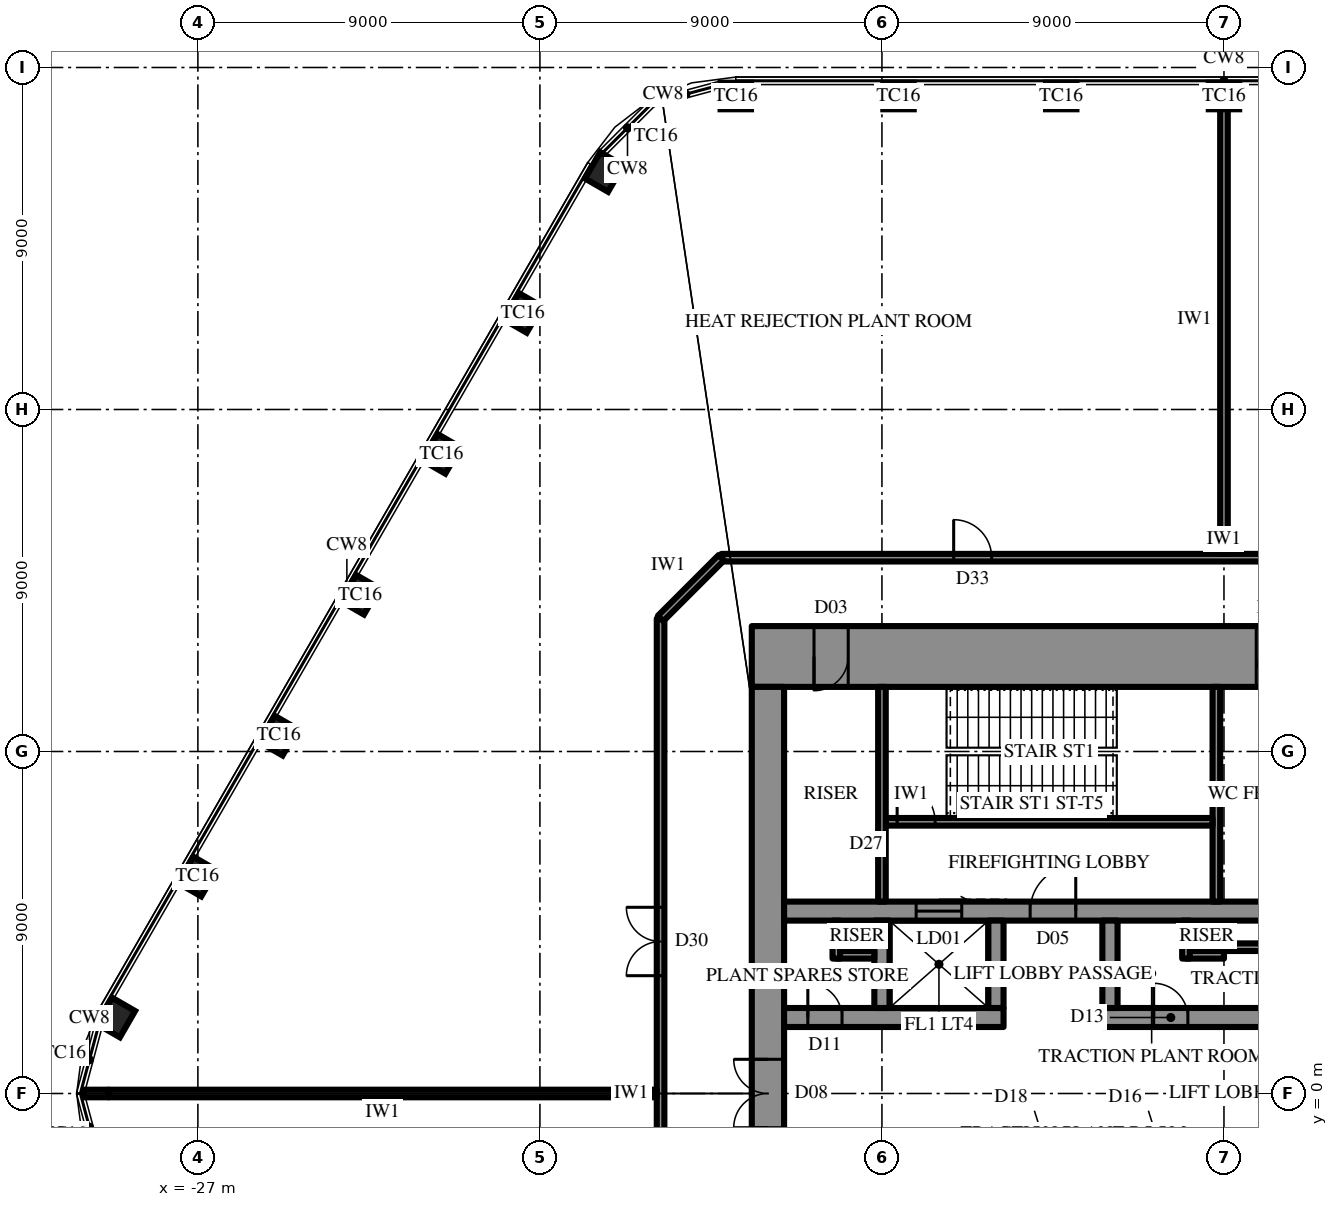
"""IFC4 building model, lengths in metres.
Left out: names, types, materials, properties, quantities, classifications, styles, units other than length and angle.
Written with IfcOpenShell. Run it as: python <this file> out.ifc"""

import sys

from ifc_helpers import new_model, si_unit, direction, frame, frame_2d, origin, origin_2d, place, context, subcontext, project, spatial, rectangle, extrude, element, fill, save


model = new_model("IFC4")
c1 = context("Model", 3, precision=1e-05, world=origin(), true_north=direction((0.0, 1.0)))
c2 = subcontext(c1, "Body", "Model", "MODEL_VIEW")
j1 = project(units=[si_unit("LENGTHUNIT", "METRE"), si_unit("PLANEANGLEUNIT", "RADIAN")], contexts=[c1])
p1 = place(None, origin())
s1 = spatial("IfcSite", under=j1, at=p1, CompositionType="ELEMENT")
p2 = place(p1, origin())
s2 = spatial("IfcBuilding", under=s1, at=p2, CompositionType="ELEMENT")
p3 = place(p2, frame((0.0, 0.0, 396.3)))
s3 = spatial("IfcBuildingStorey", under=s2, at=p3, CompositionType="ELEMENT", Elevation=396.3)
for number, where, z_axis, x_axis in (
    (1, (0.0, 26.25, 0.0), (0.0, 0.0, 1.0), (-1.0, 0.0, 0.0)),
    (2, (-4.282, 26.25, 0.0), (0.0, 0.0, 1.0), (-1.0, 0.0, 0.0)),
    (3, (-8.564, 26.25, 0.0), (0.0, 0.0, 1.0), (-1.0, 0.0, 0.0)),
    (4, (-12.846, 26.25, 0.0), (0.0, 0.0, 1.0), (-1.0, 0.0, 0.0)),
    (5, (-16.31, 24.25, 0.0), (0.0, 0.0, 1.0), (-0.5, -0.866, 0.0)),
    (6, (-18.451, 20.542, 0.0), (0.0, 0.0, 1.0), (-0.5, -0.866, 0.0)),
    (7, (-20.592, 16.833, 0.0), (0.0, 0.0, 1.0), (-0.5, -0.866, 0.0)),
    (8, (-22.733, 13.125, 0.0), (0.0, 0.0, 1.0), (-0.5, -0.866, 0.0)),
    (9, (-24.874, 9.417, 0.0), (0.0, 0.0, 1.0), (-0.5, -0.866, 0.0)),
    (10, (-27.015, 5.708, 0.0), (0.0, 0.0, 1.0), (-0.5, -0.866, 0.0)),
    (11, (-29.156, 2.0, 0.0), (0.0, 0.0, 1.0), (-0.5, -0.866, 0.0)),
):
    element("IfcColumn", number, at=place(p3, frame(where, z_axis=z_axis, x_axis=x_axis)), inside=s3, PredefinedType="COLUMN", context=c2, shape_type="SweptSolid", body=[
        extrude(rectangle(XDim=0.8, YDim=0.7, at=origin_2d()), origin(), (0.0, 0.0, 1.0), 6.0),
    ])
p4 = place(p3, frame((-12.425, 11.5, 0.0), z_axis=(0.0, 0.0, 1.0), x_axis=(1.0, 0.0, 0.0)))
e12 = element("IfcWall", 12, at=p4, inside=s3, PredefinedType="SHEAR", context=c2, shape_type="SweptSolid", body=[
    extrude(rectangle(XDim=24.85, YDim=1.6, at=frame_2d((12.425, 0.0))), origin(), (0.0, 0.0, 1.0), 6.0),
])
p5 = place(p4, frame((13.275, 0.0, 0.0)))
e13 = element("IfcOpeningElement", 13, at=p5, cuts=e12, PredefinedType="OPENING", context=c2, shape_type="SweptSolid", body=[
    extrude(rectangle(XDim=0.9, YDim=2.2, at=frame_2d((0.45, 1.1))), frame((0.0, 0.81, 0.0), z_axis=(0.0, -1.0, 0.0), x_axis=(1.0, 0.0, 0.0)), (0.0, 0.0, 1.0), 1.62),
])
p6 = place(p4, frame((16.275, 0.0, 0.0)))
e14 = element("IfcOpeningElement", 14, at=p6, cuts=e12, PredefinedType="OPENING", context=c2, shape_type="SweptSolid", body=[
    extrude(rectangle(XDim=0.9, YDim=2.2, at=frame_2d((0.45, 1.1))), frame((0.0, 0.81, 0.0), z_axis=(0.0, -1.0, 0.0), x_axis=(1.0, 0.0, 0.0)), (0.0, 0.0, 1.0), 1.62),
])
p7 = place(p4, frame((19.325, 0.0, 0.0)))
e15 = element("IfcOpeningElement", 15, at=p7, cuts=e12, PredefinedType="OPENING", context=c2, shape_type="SweptSolid", body=[
    extrude(rectangle(XDim=1.0, YDim=2.2, at=frame_2d((0.5, 1.1))), frame((0.0, 0.81, 0.0), z_axis=(0.0, -1.0, 0.0), x_axis=(1.0, 0.0, 0.0)), (0.0, 0.0, 1.0), 1.62),
])
p8 = place(p4, frame((1.637, 0.0, 0.0)))
e16 = element("IfcOpeningElement", 16, at=p8, cuts=e12, PredefinedType="OPENING", context=c2, shape_type="SweptSolid", body=[
    extrude(rectangle(XDim=0.9, YDim=2.2, at=frame_2d((0.45, 1.1))), frame((0.0, 0.81, 0.0), z_axis=(0.0, -1.0, 0.0), x_axis=(1.0, 0.0, 0.0)), (0.0, 0.0, 1.0), 1.62),
])
p9 = place(p4, frame((22.312, 0.0, 0.0)))
e17 = element("IfcOpeningElement", 17, at=p9, cuts=e12, PredefinedType="OPENING", context=c2, shape_type="SweptSolid", body=[
    extrude(rectangle(XDim=0.9, YDim=2.2, at=frame_2d((0.45, 1.1))), frame((0.0, 0.81, 0.0), z_axis=(0.0, -1.0, 0.0), x_axis=(1.0, 0.0, 0.0)), (0.0, 0.0, 1.0), 1.62),
])
p10 = place(p3, frame((-12.0, 10.7, 0.0), z_axis=(0.0, 0.0, 1.0), x_axis=(0.0, -1.0, 0.0)))
e18 = element("IfcWall", 18, at=p10, inside=s3, PredefinedType="SHEAR", context=c2, shape_type="SweptSolid", body=[
    extrude(rectangle(XDim=21.4, YDim=0.85, at=frame_2d((10.7, 0.0))), origin(), (0.0, 0.0, 1.0), 6.0),
])
p11 = place(p10, frame((9.8, 0.0, 0.0)))
e19 = element("IfcOpeningElement", 19, at=p11, cuts=e18, PredefinedType="OPENING", context=c2, shape_type="SweptSolid", body=[
    extrude(rectangle(XDim=1.8, YDim=2.4, at=frame_2d((0.9, 1.2))), frame((0.0, 0.435, 0.0), z_axis=(0.0, -1.0, 0.0), x_axis=(1.0, 0.0, 0.0)), (0.0, 0.0, 1.0), 0.87),
])
p12 = place(p3, frame((-11.575, 2.0, 0.0), z_axis=(0.0, 0.0, 1.0), x_axis=(1.0, 0.0, 0.0)))
e20 = element("IfcWall", 20, at=p12, inside=s3, PredefinedType="SHEAR", context=c2, shape_type="SweptSolid", body=[
    extrude(rectangle(XDim=5.775, YDim=0.5, at=frame_2d((2.887, 0.0))), origin(), (0.0, 0.0, 1.0), 6.0),
])
p13 = place(p12, frame((0.625, 0.0, 0.0)))
e21 = element("IfcOpeningElement", 21, at=p13, cuts=e20, PredefinedType="OPENING", context=c2, shape_type="SweptSolid", body=[
    extrude(rectangle(XDim=0.9, YDim=2.2, at=frame_2d((0.45, 1.1))), frame((0.0, 0.26, 0.0), z_axis=(0.0, -1.0, 0.0), x_axis=(1.0, 0.0, 0.0)), (0.0, 0.0, 1.0), 0.52),
])
p14 = place(p3, frame((-3.2, 2.0, 0.0), z_axis=(0.0, 0.0, 1.0), x_axis=(1.0, 0.0, 0.0)))
e22 = element("IfcWall", 22, at=p14, inside=s3, PredefinedType="SHEAR", context=c2, shape_type="SweptSolid", body=[
    extrude(rectangle(XDim=14.775, YDim=0.5, at=frame_2d((7.387, 0.0))), origin(), (0.0, 0.0, 1.0), 6.0),
])
p15 = place(p14, frame((1.35, 0.0, 0.0)))
e23 = element("IfcOpeningElement", 23, at=p15, cuts=e22, PredefinedType="OPENING", context=c2, shape_type="SweptSolid", body=[
    extrude(rectangle(XDim=0.9, YDim=2.2, at=frame_2d((0.45, 1.1))), frame((0.0, 0.26, 0.0), z_axis=(0.0, -1.0, 0.0), x_axis=(1.0, 0.0, 0.0)), (0.0, 0.0, 1.0), 0.52),
])
p16 = place(p14, frame((4.25, 0.0, 0.0)))
e24 = element("IfcOpeningElement", 24, at=p16, cuts=e22, PredefinedType="OPENING", context=c2, shape_type="SweptSolid", body=[
    extrude(rectangle(XDim=0.9, YDim=2.2, at=frame_2d((0.45, 1.1))), frame((0.0, 0.26, 0.0), z_axis=(0.0, -1.0, 0.0), x_axis=(1.0, 0.0, 0.0)), (0.0, 0.0, 1.0), 0.52),
])
p17 = place(p14, frame((7.25, 0.0, 0.0)))
e25 = element("IfcOpeningElement", 25, at=p17, cuts=e22, PredefinedType="OPENING", context=c2, shape_type="SweptSolid", body=[
    extrude(rectangle(XDim=0.9, YDim=2.2, at=frame_2d((0.45, 1.1))), frame((0.0, 0.26, 0.0), z_axis=(0.0, -1.0, 0.0), x_axis=(1.0, 0.0, 0.0)), (0.0, 0.0, 1.0), 0.52),
])
p18 = place(p14, frame((10.15, 0.0, 0.0)))
e26 = element("IfcOpeningElement", 26, at=p18, cuts=e22, PredefinedType="OPENING", context=c2, shape_type="SweptSolid", body=[
    extrude(rectangle(XDim=0.9, YDim=2.2, at=frame_2d((0.45, 1.1))), frame((0.0, 0.26, 0.0), z_axis=(0.0, -1.0, 0.0), x_axis=(1.0, 0.0, 0.0)), (0.0, 0.0, 1.0), 0.52),
])
p19 = place(p14, frame((13.25, 0.0, 0.0)))
e27 = element("IfcOpeningElement", 27, at=p19, cuts=e22, PredefinedType="OPENING", context=c2, shape_type="SweptSolid", body=[
    extrude(rectangle(XDim=0.9, YDim=2.2, at=frame_2d((0.45, 1.1))), frame((0.0, 0.26, 0.0), z_axis=(0.0, -1.0, 0.0), x_axis=(1.0, 0.0, 0.0)), (0.0, 0.0, 1.0), 0.52),
])
p20 = place(p3, frame((-11.575, 4.8, 0.0), z_axis=(0.0, 0.0, 1.0), x_axis=(1.0, 0.0, 0.0)))
e28 = element("IfcWall", 28, at=p20, inside=s3, PredefinedType="SHEAR", context=c2, shape_type="SweptSolid", body=[
    extrude(rectangle(XDim=23.15, YDim=0.5, at=frame_2d((11.575, 0.0))), origin(), (0.0, 0.0, 1.0), 6.0),
])
p21 = place(p20, frame((6.475, 0.0, 0.0)))
e29 = element("IfcOpeningElement", 29, at=p21, cuts=e28, PredefinedType="OPENING", context=c2, shape_type="SweptSolid", body=[
    extrude(rectangle(XDim=1.2, YDim=2.2, at=frame_2d((0.6, 1.1))), frame((0.0, 0.26, 0.0), z_axis=(0.0, -1.0, 0.0), x_axis=(1.0, 0.0, 0.0)), (0.0, 0.0, 1.0), 0.52),
])
p22 = place(p20, frame((3.475, 0.0, 0.0)))
e30 = element("IfcOpeningElement", 30, at=p22, cuts=e28, PredefinedType="OPENING", context=c2, shape_type="SweptSolid", body=[
    extrude(rectangle(XDim=1.2, YDim=2.2, at=frame_2d((0.6, 1.1))), frame((0.0, 0.26, 0.0), z_axis=(0.0, -1.0, 0.0), x_axis=(1.0, 0.0, 0.0)), (0.0, 0.0, 1.0), 0.52),
])
for number, where, z_axis, x_axis in (
    (31, (-9.0, 2.25, 0.0), (0.0, 0.0, 1.0), (0.0, 1.0, 0.0)),
    (32, (-6.0, 2.25, 0.0), (0.0, 0.0, 1.0), (0.0, 1.0, 0.0)),
    (33, (-3.0, 2.25, 0.0), (0.0, 0.0, 1.0), (0.0, 1.0, 0.0)),
):
    element("IfcWall", number, at=place(p3, frame(where, z_axis=z_axis, x_axis=x_axis)), inside=s3, PredefinedType="SHEAR", context=c2, shape_type="SweptSolid", body=[
        extrude(rectangle(XDim=2.3, YDim=0.4, at=frame_2d((1.15, 0.0))), origin(), (0.0, 0.0, 1.0), 6.0),
    ])
p23 = place(p3, frame((-0.2, 5.05, 0.0), z_axis=(0.0, 0.0, 1.0), x_axis=(0.0, 1.0, 0.0)))
e34 = element("IfcWall", 34, at=p23, inside=s3, PredefinedType="SHEAR", context=c2, shape_type="SweptSolid", body=[
    extrude(rectangle(XDim=5.65, YDim=0.2, at=frame_2d((2.825, 0.0))), origin(), (0.0, 0.0, 1.0), 6.0),
])
p24 = place(p3, frame((-8.9, 7.15, 0.0), z_axis=(0.0, 0.0, 1.0), x_axis=(1.0, 0.0, 0.0)))
e35 = element("IfcWall", 35, at=p24, inside=s3, PredefinedType="SHEAR", context=c2, shape_type="SweptSolid", body=[
    extrude(rectangle(XDim=8.6, YDim=0.2, at=frame_2d((4.3, 0.0))), origin(), (0.0, 0.0, 1.0), 6.0),
])
p25 = place(p24, frame((0.3, 0.0, 0.0)))
e36 = element("IfcOpeningElement", 36, at=p25, cuts=e35, PredefinedType="OPENING", context=c2, shape_type="SweptSolid", body=[
    extrude(rectangle(XDim=1.0, YDim=2.2, at=frame_2d((0.5, 1.1))), frame((0.0, 0.11, 0.0), z_axis=(0.0, -1.0, 0.0), x_axis=(1.0, 0.0, 0.0)), (0.0, 0.0, 1.0), 0.22),
])
p26 = place(p3, frame((-9.0, 5.05, 0.0), z_axis=(0.0, 0.0, 1.0), x_axis=(0.0, 1.0, 0.0)))
e37 = element("IfcWall", 37, at=p26, inside=s3, PredefinedType="PARTITIONING", context=c2, shape_type="SweptSolid", body=[
    extrude(rectangle(XDim=5.65, YDim=0.2, at=frame_2d((2.825, 0.0))), origin(), (0.0, 0.0, 1.0), 5.8),
])
for number, where, z_axis, x_axis in (
    (38, (-10.2, 3.65, 0.0), (0.0, 0.0, 1.0), (1.0, 0.0, 0.0)),
    (39, (-10.2, 3.55, 0.0), (0.0, 0.0, 1.0), (0.0, 1.0, 0.0)),
    (40, (-1.0, 3.65, 0.0), (0.0, 0.0, 1.0), (1.0, 0.0, 0.0)),
    (41, (-1.0, 3.55, 0.0), (0.0, 0.0, 1.0), (0.0, 1.0, 0.0)),
):
    element("IfcWall", number, at=place(p3, frame(where, z_axis=z_axis, x_axis=x_axis)), inside=s3, PredefinedType="PARTITIONING", context=c2, shape_type="SweptSolid", body=[
        extrude(rectangle(XDim=1.0, YDim=0.2, at=frame_2d((0.5, 0.0))), origin(), (0.0, 0.0, 1.0), 5.8),
    ])
p27 = place(p3, frame((0.0, 3.85, 0.0), z_axis=(0.0, 0.0, 1.0), x_axis=(1.0, 0.0, 0.0)))
e42 = element("IfcWall", 42, at=p27, inside=s3, PredefinedType="PARTITIONING", context=c2, shape_type="SweptSolid", body=[
    extrude(rectangle(XDim=3.0, YDim=0.2, at=frame_2d((1.5, 0.0))), origin(), (0.0, 0.0, 1.0), 5.8),
])
p28 = place(p3, frame((-13.225, 14.1, 0.0), z_axis=(0.0, 0.0, 1.0), x_axis=(1.0, 0.0, 0.0)))
e43 = element("IfcWall", 43, at=p28, inside=s3, PredefinedType="PARTITIONING", context=c2, shape_type="SweptSolid", body=[
    extrude(rectangle(XDim=26.45, YDim=0.2, at=frame_2d((13.225, 0.0))), origin(), (0.0, 0.0, 1.0), 5.8),
])
p29 = place(p28, frame((6.113, 0.0, 0.0)))
e44 = element("IfcOpeningElement", 44, at=p29, cuts=e43, PredefinedType="OPENING", context=c2, shape_type="SweptSolid", body=[
    extrude(rectangle(XDim=1.0, YDim=2.2, at=frame_2d((0.5, 1.1))), frame((0.0, 0.11, 0.0), z_axis=(0.0, -1.0, 0.0), x_axis=(1.0, 0.0, 0.0)), (0.0, 0.0, 1.0), 0.22),
])
p30 = place(p3, frame((-14.825, -12.5, 0.0), z_axis=(0.0, 0.0, 1.0), x_axis=(0.0, 1.0, 0.0)))
e45 = element("IfcWall", 45, at=p30, inside=s3, PredefinedType="PARTITIONING", context=c2, shape_type="SweptSolid", body=[
    extrude(rectangle(XDim=25.0, YDim=0.2, at=frame_2d((12.5, 0.0))), origin(), (0.0, 0.0, 1.0), 5.8),
])
p31 = place(p30, frame((15.6, 0.0, 0.0)))
e46 = element("IfcOpeningElement", 46, at=p31, cuts=e45, PredefinedType="OPENING", context=c2, shape_type="SweptSolid", body=[
    extrude(rectangle(XDim=1.8, YDim=2.4, at=frame_2d((0.9, 1.2))), frame((0.0, 0.11, 0.0), z_axis=(0.0, -1.0, 0.0), x_axis=(1.0, 0.0, 0.0)), (0.0, 0.0, 1.0), 0.22),
])
p32 = place(p30, frame((7.6, 0.0, 0.0)))
e47 = element("IfcOpeningElement", 47, at=p32, cuts=e45, PredefinedType="OPENING", context=c2, shape_type="SweptSolid", body=[
    extrude(rectangle(XDim=1.8, YDim=2.4, at=frame_2d((0.9, 1.2))), frame((0.0, 0.11, 0.0), z_axis=(0.0, -1.0, 0.0), x_axis=(1.0, 0.0, 0.0)), (0.0, 0.0, 1.0), 0.22),
])
p33 = place(p3, frame((-14.825, 12.5, 0.0), z_axis=(0.0, 0.0, 1.0), x_axis=(0.707052830339, 0.707160727918, 0.0)))
e48 = element("IfcWall", 48, at=p33, inside=s3, PredefinedType="PARTITIONING", context=c2, shape_type="SweptSolid", body=[
    extrude(rectangle(XDim=2.263, YDim=0.2, at=frame_2d((1.131, 0.0))), origin(), (0.0, 0.0, 1.0), 5.8),
])
p34 = place(p3, frame((0.0, 14.2, 0.0), z_axis=(0.0, 0.0, 1.0), x_axis=(0.0, 1.0, 0.0)))
e49 = element("IfcWall", 49, at=p34, inside=s3, PredefinedType="PARTITIONING", context=c2, shape_type="SweptSolid", body=[
    extrude(rectangle(XDim=12.36, YDim=0.2, at=frame_2d((6.18, 0.0))), origin(), (0.0, 0.0, 1.0), 4.792),
])
p35 = place(p3, frame((-14.925, 0.0, 0.0), z_axis=(0.0, 0.0, 1.0), x_axis=(-1.0, 0.0, 0.0)))
e50 = element("IfcWall", 50, at=p35, inside=s3, PredefinedType="PARTITIONING", context=c2, shape_type="SweptSolid", body=[
    extrude(rectangle(XDim=14.422, YDim=0.2, at=frame_2d((7.211, 0.0))), origin(), (0.0, 0.0, 1.0), 4.744),
])
p36 = place(p3, frame((-29.347, 0.0, 0.0), z_axis=(0.0, 0.0, 1.0), x_axis=(-1.0, 0.0, 0.0)))
e51 = element("IfcWall", 51, at=p36, inside=s3, PredefinedType="PARTITIONING", context=c2, shape_type="SweptSolid", body=[
    extrude(rectangle(XDim=0.657, YDim=0.2, at=frame_2d((0.328, 0.0))), origin(), (0.0, 0.0, 1.0), 5.8),
])
p37 = place(p11, frame((1.8, 0.0, 0.0), z_axis=(0.0, 0.0, 1.0), x_axis=(-1.0, 0.0, 0.0)))
e52 = element("IfcDoor", 52, at=p37, inside=s3, OperationType="DOUBLE_DOOR_SINGLE_SWING", PredefinedType="DOOR", context=c2, shape_type="SweptSolid", body=[
    extrude(rectangle(XDim=1.8, YDim=2.4, at=frame_2d((0.9, 1.2))), frame((0.0, 0.025, 0.0), z_axis=(0.0, -1.0, 0.0), x_axis=(1.0, 0.0, 0.0)), (0.0, 0.0, 1.0), 0.05),
])
fill(e19, e52)
p38 = place(p21, origin())
e53 = element("IfcDoor", 53, at=p38, inside=s3, OperationType="SINGLE_SWING_LEFT", PredefinedType="DOOR", context=c2, shape_type="SweptSolid", body=[
    extrude(rectangle(XDim=1.2, YDim=2.2, at=frame_2d((0.6, 1.1))), frame((0.0, 0.025, 0.0), z_axis=(0.0, -1.0, 0.0), x_axis=(1.0, 0.0, 0.0)), (0.0, 0.0, 1.0), 0.05),
])
fill(e29, e53)
p39 = place(p25, origin())
e54 = element("IfcDoor", 54, at=p39, inside=s3, OperationType="SINGLE_SWING_RIGHT", PredefinedType="DOOR", context=c2, shape_type="SweptSolid", body=[
    extrude(rectangle(XDim=1.0, YDim=2.2, at=frame_2d((0.5, 1.1))), frame((0.0, 0.025, 0.0), z_axis=(0.0, -1.0, 0.0), x_axis=(1.0, 0.0, 0.0)), (0.0, 0.0, 1.0), 0.05),
])
fill(e36, e54)
p40 = place(p5, frame((0.9, 0.0, 0.0), z_axis=(0.0, 0.0, 1.0), x_axis=(-1.0, 0.0, 0.0)))
e55 = element("IfcDoor", 55, at=p40, inside=s3, OperationType="SINGLE_SWING_RIGHT", PredefinedType="DOOR", context=c2, shape_type="SweptSolid", body=[
    extrude(rectangle(XDim=0.9, YDim=2.2, at=frame_2d((0.45, 1.1))), frame((0.0, 0.025, 0.0), z_axis=(0.0, -1.0, 0.0), x_axis=(1.0, 0.0, 0.0)), (0.0, 0.0, 1.0), 0.05),
])
fill(e13, e55)
p41 = place(p8, frame((0.9, 0.0, 0.0), z_axis=(0.0, 0.0, 1.0), x_axis=(-1.0, 0.0, 0.0)))
e56 = element("IfcDoor", 56, at=p41, inside=s3, OperationType="SINGLE_SWING_LEFT", PredefinedType="DOOR", context=c2, shape_type="SweptSolid", body=[
    extrude(rectangle(XDim=0.9, YDim=2.2, at=frame_2d((0.45, 1.1))), frame((0.0, 0.025, 0.0), z_axis=(0.0, -1.0, 0.0), x_axis=(1.0, 0.0, 0.0)), (0.0, 0.0, 1.0), 0.05),
])
fill(e16, e56)
p42 = place(p13, origin())
e57 = element("IfcDoor", 57, at=p42, inside=s3, OperationType="SINGLE_SWING_RIGHT", PredefinedType="DOOR", context=c2, shape_type="SweptSolid", body=[
    extrude(rectangle(XDim=0.9, YDim=2.2, at=frame_2d((0.45, 1.1))), frame((0.0, 0.025, 0.0), z_axis=(0.0, -1.0, 0.0), x_axis=(1.0, 0.0, 0.0)), (0.0, 0.0, 1.0), 0.05),
])
fill(e21, e57)
p43 = place(p15, origin())
e58 = element("IfcDoor", 58, at=p43, inside=s3, OperationType="SINGLE_SWING_RIGHT", PredefinedType="DOOR", context=c2, shape_type="SweptSolid", body=[
    extrude(rectangle(XDim=0.9, YDim=2.2, at=frame_2d((0.45, 1.1))), frame((0.0, 0.025, 0.0), z_axis=(0.0, -1.0, 0.0), x_axis=(1.0, 0.0, 0.0)), (0.0, 0.0, 1.0), 0.05),
])
fill(e23, e58)
p44 = place(p22, origin())
e59 = element("IfcDoor", 59, at=p44, inside=s3, OperationType="SLIDING_TO_LEFT", PredefinedType="DOOR", context=c2, shape_type="SweptSolid", body=[
    extrude(rectangle(XDim=1.2, YDim=2.2, at=frame_2d((0.6, 1.1))), frame((0.0, 0.025, 0.0), z_axis=(0.0, -1.0, 0.0), x_axis=(1.0, 0.0, 0.0)), (0.0, 0.0, 1.0), 0.05),
])
fill(e30, e59)
p45 = place(p29, origin())
e60 = element("IfcDoor", 60, at=p45, inside=s3, OperationType="SINGLE_SWING_RIGHT", PredefinedType="DOOR", context=c2, shape_type="SweptSolid", body=[
    extrude(rectangle(XDim=1.0, YDim=2.2, at=frame_2d((0.5, 1.1))), frame((0.0, 0.025, 0.0), z_axis=(0.0, -1.0, 0.0), x_axis=(1.0, 0.0, 0.0)), (0.0, 0.0, 1.0), 0.05),
])
fill(e44, e60)
p46 = place(p31, origin())
e61 = element("IfcDoor", 61, at=p46, inside=s3, OperationType="DOUBLE_DOOR_SINGLE_SWING", PredefinedType="DOOR", context=c2, shape_type="SweptSolid", body=[
    extrude(rectangle(XDim=1.8, YDim=2.4, at=frame_2d((0.9, 1.2))), frame((0.0, 0.025, 0.0), z_axis=(0.0, -1.0, 0.0), x_axis=(1.0, 0.0, 0.0)), (0.0, 0.0, 1.0), 0.05),
])
fill(e46, e61)
save(model, sys.argv[1])
